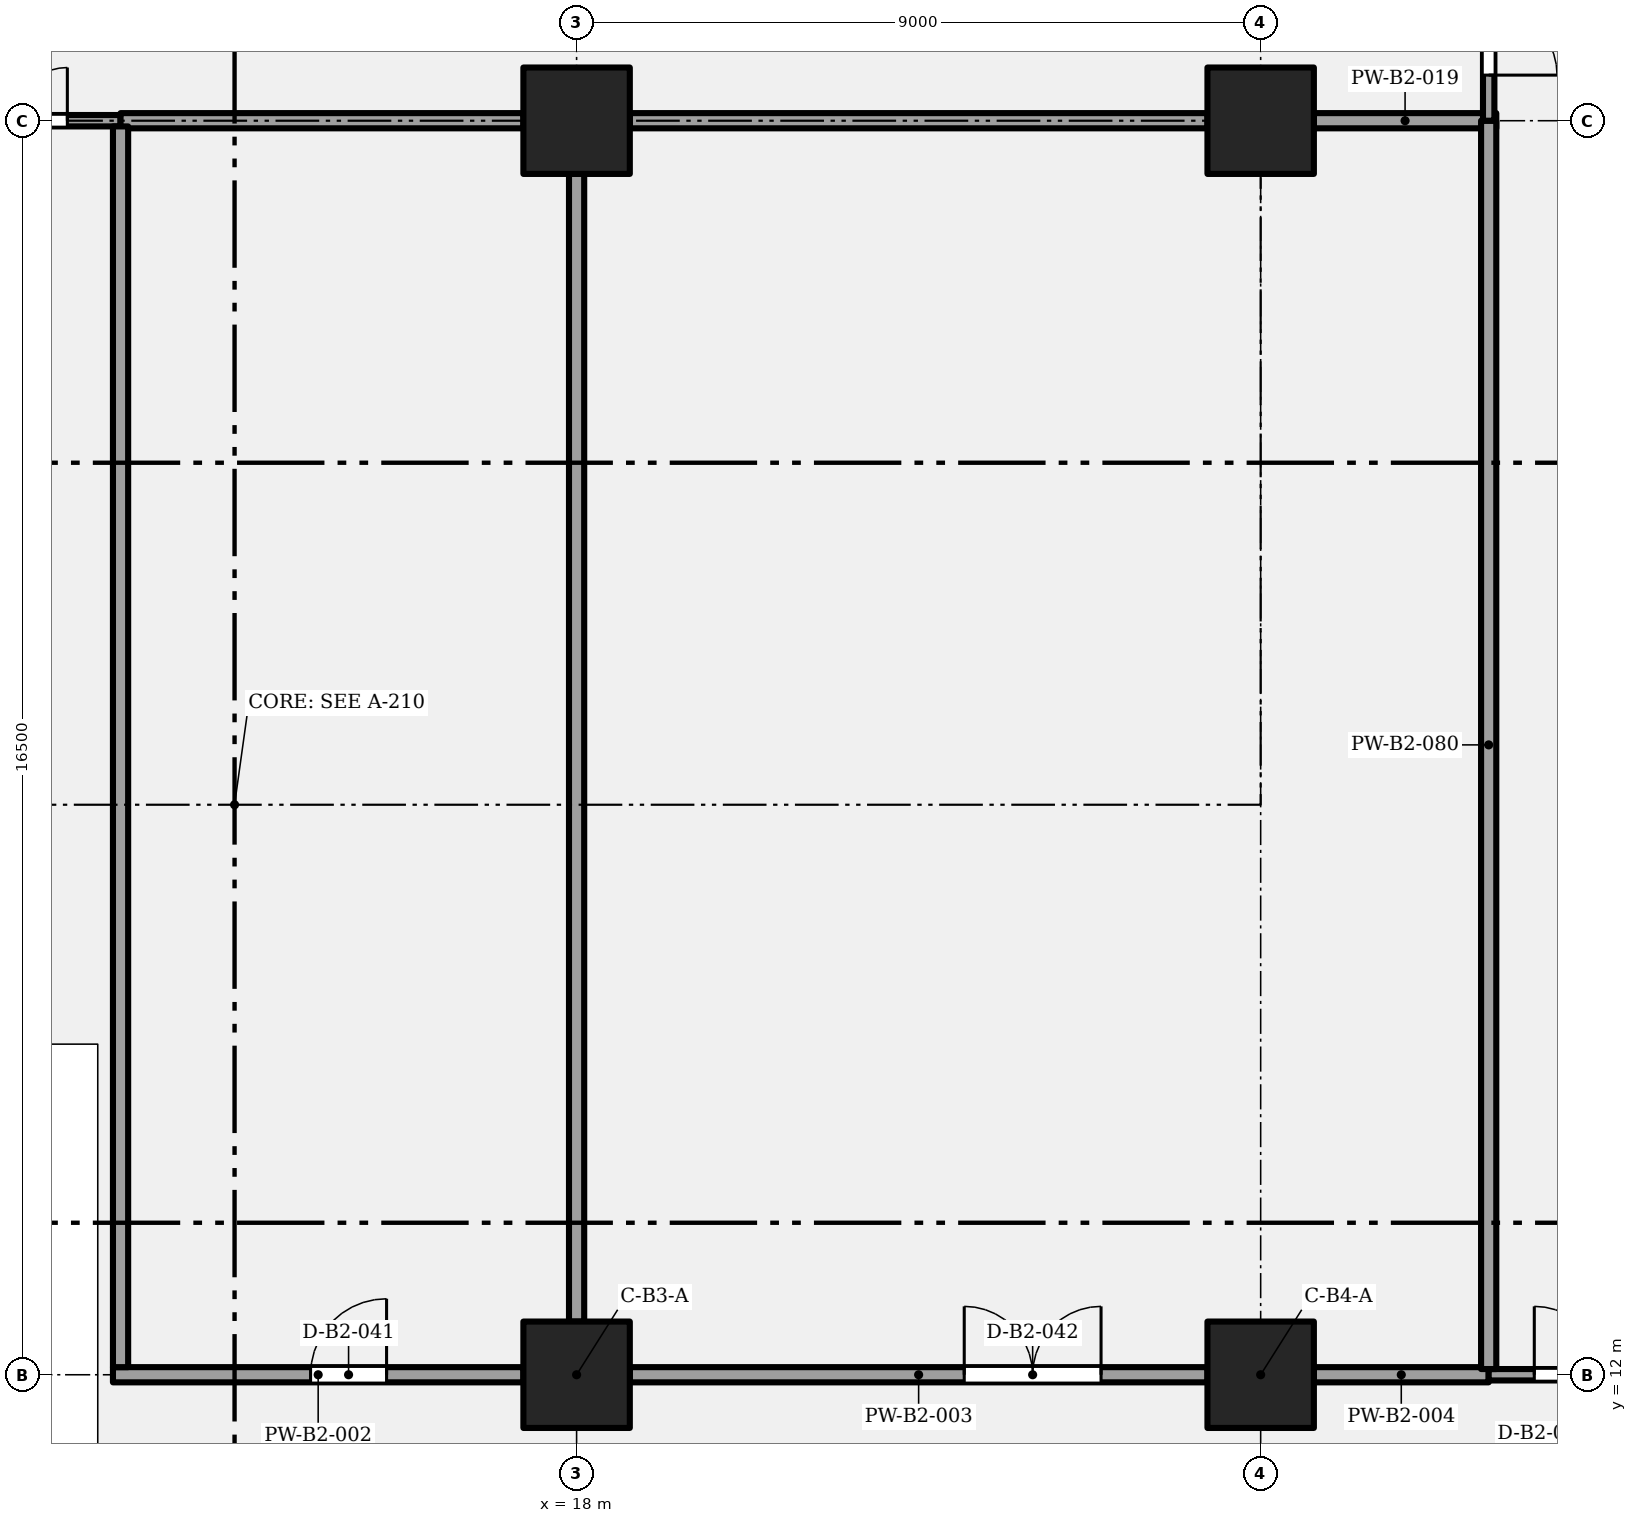
"""IFC4 building model, lengths in metres.
Left out: names, types, materials, properties, quantities, classifications, styles, units other than length and angle.
Written with IfcOpenShell. Run it as: python <this file> out.ifc"""

import sys

from ifc_helpers import new_model, si_unit, direction, frame, frame_2d, origin, origin_2d, place, context, subcontext, project, spatial, rectangle, extrude, element, fill, save


model = new_model("IFC4")
c1 = context("Model", 3, precision=1e-05, world=origin(), true_north=direction((0.0, 1.0)))
c2 = subcontext(c1, "Body", "Model", "MODEL_VIEW")
j1 = project(units=[si_unit("LENGTHUNIT", "METRE"), si_unit("PLANEANGLEUNIT", "RADIAN")], contexts=[c1])
p1 = place(None, origin())
s1 = spatial("IfcSite", under=j1, at=p1, CompositionType="ELEMENT")
p2 = place(p1, origin())
s2 = spatial("IfcBuilding", under=s1, at=p2, CompositionType="ELEMENT")
p3 = place(p2, frame((0.0, 0.0, -8.4)))
s3 = spatial("IfcBuildingStorey", under=s2, at=p3, CompositionType="ELEMENT", Elevation=-8.4)
for number, where, z_axis, x_axis in (
    (1, (18.0, 12.0, 0.0), (0.0, 0.0, 1.0), (1.0, 0.0, 0.0)),
    (2, (27.0, 12.0, 0.0), (0.0, 0.0, 1.0), (1.0, 0.0, 0.0)),
    (3, (18.0, 28.5, 0.0), (0.0, 0.0, 1.0), (1.0, 0.0, 0.0)),
    (4, (27.0, 28.5, 0.0), (0.0, 0.0, 1.0), (1.0, 0.0, 0.0)),
):
    element("IfcColumn", number, at=place(p3, frame(where, z_axis=z_axis, x_axis=x_axis)), inside=s3, PredefinedType="COLUMN", context=c2, shape_type="SweptSolid", body=[
        extrude(rectangle(XDim=1.4, YDim=1.4, at=origin_2d()), origin(), (0.0, 0.0, 1.0), 4.2),
    ])
p4 = place(p3, frame((11.9, 12.0, 0.0), z_axis=(0.0, 0.0, 1.0), x_axis=(1.0, 0.0, 0.0)))
e5 = element("IfcWall", 5, at=p4, inside=s3, PredefinedType="PARTITIONING", context=c2, shape_type="SweptSolid", body=[
    extrude(rectangle(XDim=5.4, YDim=0.2, at=frame_2d((2.7, 0.0))), origin(), (0.0, 0.0, 1.0), 3.05),
])
p5 = place(p4, frame((2.6, 0.0, 0.0)))
e6 = element("IfcOpeningElement", 6, at=p5, cuts=e5, PredefinedType="OPENING", context=c2, shape_type="SweptSolid", body=[
    extrude(rectangle(XDim=1.0, YDim=2.1, at=frame_2d((0.5, 1.05))), frame((0.0, 0.11, 0.0), z_axis=(0.0, -1.0, 0.0), x_axis=(1.0, 0.0, 0.0)), (0.0, 0.0, 1.0), 0.22),
])
p6 = place(p3, frame((18.7, 12.0, 0.0), z_axis=(0.0, 0.0, 1.0), x_axis=(1.0, 0.0, 0.0)))
e7 = element("IfcWall", 7, at=p6, inside=s3, PredefinedType="PARTITIONING", context=c2, shape_type="SweptSolid", body=[
    extrude(rectangle(XDim=7.6, YDim=0.2, at=frame_2d((3.8, 0.0))), origin(), (0.0, 0.0, 1.0), 3.05),
])
p7 = place(p6, frame((4.4, 0.0, 0.0)))
e8 = element("IfcOpeningElement", 8, at=p7, cuts=e7, PredefinedType="OPENING", context=c2, shape_type="SweptSolid", body=[
    extrude(rectangle(XDim=1.8, YDim=2.4, at=frame_2d((0.9, 1.2))), frame((0.0, 0.11, 0.0), z_axis=(0.0, -1.0, 0.0), x_axis=(1.0, 0.0, 0.0)), (0.0, 0.0, 1.0), 0.22),
])
p8 = place(p3, frame((27.7, 12.0, 0.0), z_axis=(0.0, 0.0, 1.0), x_axis=(1.0, 0.0, 0.0)))
e9 = element("IfcWall", 9, at=p8, inside=s3, PredefinedType="PARTITIONING", context=c2, shape_type="SweptSolid", body=[
    extrude(rectangle(XDim=2.3, YDim=0.2, at=frame_2d((1.15, 0.0))), origin(), (0.0, 0.0, 1.0), 3.05),
])
p9 = place(p3, frame((30.0, 12.0, 0.0), z_axis=(0.0, 0.0, 1.0), x_axis=(1.0, 0.0, 0.0)))
e10 = element("IfcWall", 10, at=p9, inside=s3, PredefinedType="PARTITIONING", context=c2, shape_type="SweptSolid", body=[
    extrude(rectangle(XDim=3.0, YDim=0.15, at=frame_2d((1.5, 0.0))), origin(), (0.0, 0.0, 1.0), 3.05),
])
p10 = place(p9, frame((0.6, 0.0, 0.0)))
e11 = element("IfcOpeningElement", 11, at=p10, cuts=e10, PredefinedType="OPENING", context=c2, shape_type="SweptSolid", body=[
    extrude(rectangle(XDim=1.8, YDim=2.1, at=frame_2d((0.9, 1.05))), frame((0.0, 0.085, 0.0), z_axis=(0.0, -1.0, 0.0), x_axis=(1.0, 0.0, 0.0)), (0.0, 0.0, 1.0), 0.17),
])
p11 = place(p3, frame((9.7, 28.5, 0.0), z_axis=(0.0, 0.0, 1.0), x_axis=(1.0, 0.0, 0.0)))
e12 = element("IfcWall", 12, at=p11, inside=s3, PredefinedType="PARTITIONING", context=c2, shape_type="SweptSolid", body=[
    extrude(rectangle(XDim=2.3, YDim=0.15, at=frame_2d((1.15, 0.0))), origin(), (0.0, 0.0, 1.0), 3.05),
])
p12 = place(p11, frame((0.2, 0.0, 0.0)))
e13 = element("IfcOpeningElement", 13, at=p12, cuts=e12, PredefinedType="OPENING", context=c2, shape_type="SweptSolid", body=[
    extrude(rectangle(XDim=1.4, YDim=2.1, at=frame_2d((0.7, 1.05))), frame((0.0, 0.085, 0.0), z_axis=(0.0, -1.0, 0.0), x_axis=(1.0, 0.0, 0.0)), (0.0, 0.0, 1.0), 0.17),
])
p13 = place(p3, frame((12.0, 28.5, 0.0), z_axis=(0.0, 0.0, 1.0), x_axis=(1.0, 0.0, 0.0)))
e14 = element("IfcWall", 14, at=p13, inside=s3, PredefinedType="PARTITIONING", context=c2, shape_type="SweptSolid", body=[
    extrude(rectangle(XDim=5.3, YDim=0.2, at=frame_2d((2.65, 0.0))), origin(), (0.0, 0.0, 1.0), 3.05),
])
p14 = place(p3, frame((18.7, 28.5, 0.0), z_axis=(0.0, 0.0, 1.0), x_axis=(1.0, 0.0, 0.0)))
e15 = element("IfcWall", 15, at=p14, inside=s3, PredefinedType="PARTITIONING", context=c2, shape_type="SweptSolid", body=[
    extrude(rectangle(XDim=7.6, YDim=0.2, at=frame_2d((3.8, 0.0))), origin(), (0.0, 0.0, 1.0), 3.05),
])
p15 = place(p3, frame((27.7, 28.5, 0.0), z_axis=(0.0, 0.0, 1.0), x_axis=(1.0, 0.0, 0.0)))
e16 = element("IfcWall", 16, at=p15, inside=s3, PredefinedType="PARTITIONING", context=c2, shape_type="SweptSolid", body=[
    extrude(rectangle(XDim=2.4, YDim=0.2, at=frame_2d((1.2, 0.0))), origin(), (0.0, 0.0, 1.0), 3.05),
])
p16 = place(p3, frame((12.0, 12.1, 0.0), z_axis=(0.0, 0.0, 1.0), x_axis=(0.0, 1.0, 0.0)))
e17 = element("IfcWall", 17, at=p16, inside=s3, PredefinedType="PARTITIONING", context=c2, shape_type="SweptSolid", body=[
    extrude(rectangle(XDim=16.325, YDim=0.2, at=frame_2d((8.163, 0.0))), origin(), (0.0, 0.0, 1.0), 3.8),
])
p17 = place(p3, frame((18.0, 12.7, 0.0), z_axis=(0.0, 0.0, 1.0), x_axis=(0.0, 1.0, 0.0)))
e18 = element("IfcWall", 18, at=p17, inside=s3, PredefinedType="PARTITIONING", context=c2, shape_type="SweptSolid", body=[
    extrude(rectangle(XDim=15.1, YDim=0.2, at=frame_2d((7.55, 0.0))), origin(), (0.0, 0.0, 1.0), 2.85),
])
p18 = place(p3, frame((30.0, 12.075, 0.0), z_axis=(0.0, 0.0, 1.0), x_axis=(0.0, 1.0, 0.0)))
e19 = element("IfcWall", 19, at=p18, inside=s3, PredefinedType="PARTITIONING", context=c2, shape_type="SweptSolid", body=[
    extrude(rectangle(XDim=16.425, YDim=0.2, at=frame_2d((8.212, 0.0))), origin(), (0.0, 0.0, 1.0), 3.8),
])
p19 = place(p3, frame((30.0, 28.5, 0.0), z_axis=(0.0, 0.0, 1.0), x_axis=(0.0, 1.0, 0.0)))
e20 = element("IfcWall", 20, at=p19, inside=s3, PredefinedType="PARTITIONING", context=c2, shape_type="SweptSolid", body=[
    extrude(rectangle(XDim=9.0, YDim=0.15, at=frame_2d((4.5, 0.0))), origin(), (0.0, 0.0, 1.0), 3.8),
])
p20 = place(p19, frame((2.4, 0.0, 0.0), z_axis=(0.0, 0.0, 1.0), x_axis=(-1.0, 0.0, 0.0)))
e21 = element("IfcOpeningElement", 21, at=p20, cuts=e20, PredefinedType="OPENING", context=c2, shape_type="SweptSolid", body=[
    extrude(rectangle(XDim=1.8, YDim=2.1, at=frame_2d((0.9, 1.05))), frame((0.0, 0.085, 0.0), z_axis=(0.0, -1.0, 0.0), x_axis=(1.0, 0.0, 0.0)), (0.0, 0.0, 1.0), 0.17),
])
p21 = place(p12, origin())
e22 = element("IfcDoor", 22, at=p21, inside=s3, OperationType="DOUBLE_DOOR_SINGLE_SWING", PredefinedType="DOOR", context=c2, shape_type="SweptSolid", body=[
    extrude(rectangle(XDim=1.4, YDim=2.1, at=frame_2d((0.7, 1.05))), frame((0.0, 0.025, 0.0), z_axis=(0.0, -1.0, 0.0), x_axis=(1.0, 0.0, 0.0)), (0.0, 0.0, 1.0), 0.05),
])
fill(e13, e22)
p22 = place(p10, origin())
e23 = element("IfcDoor", 23, at=p22, inside=s3, OperationType="DOUBLE_DOOR_SINGLE_SWING", PredefinedType="DOOR", context=c2, shape_type="SweptSolid", body=[
    extrude(rectangle(XDim=1.8, YDim=2.1, at=frame_2d((0.9, 1.05))), frame((0.0, 0.025, 0.0), z_axis=(0.0, -1.0, 0.0), x_axis=(1.0, 0.0, 0.0)), (0.0, 0.0, 1.0), 0.05),
])
fill(e11, e23)
p23 = place(p20, origin())
e24 = element("IfcDoor", 24, at=p23, inside=s3, OperationType="DOUBLE_DOOR_SINGLE_SWING", PredefinedType="DOOR", context=c2, shape_type="SweptSolid", body=[
    extrude(rectangle(XDim=1.8, YDim=2.1, at=frame_2d((0.9, 1.05))), frame((0.0, 0.025, 0.0), z_axis=(0.0, -1.0, 0.0), x_axis=(1.0, 0.0, 0.0)), (0.0, 0.0, 1.0), 0.05),
])
fill(e21, e24)
p24 = place(p5, origin())
e25 = element("IfcDoor", 25, at=p24, inside=s3, OperationType="SINGLE_SWING_RIGHT", PredefinedType="DOOR", context=c2, shape_type="SweptSolid", body=[
    extrude(rectangle(XDim=1.0, YDim=2.1, at=frame_2d((0.5, 1.05))), frame((0.0, 0.025, 0.0), z_axis=(0.0, -1.0, 0.0), x_axis=(1.0, 0.0, 0.0)), (0.0, 0.0, 1.0), 0.05),
])
fill(e6, e25)
p25 = place(p7, origin())
e26 = element("IfcDoor", 26, at=p25, inside=s3, OperationType="DOUBLE_DOOR_SINGLE_SWING", PredefinedType="DOOR", context=c2, shape_type="SweptSolid", body=[
    extrude(rectangle(XDim=1.8, YDim=2.4, at=frame_2d((0.9, 1.2))), frame((0.0, 0.025, 0.0), z_axis=(0.0, -1.0, 0.0), x_axis=(1.0, 0.0, 0.0)), (0.0, 0.0, 1.0), 0.05),
])
fill(e8, e26)
save(model, sys.argv[1])
